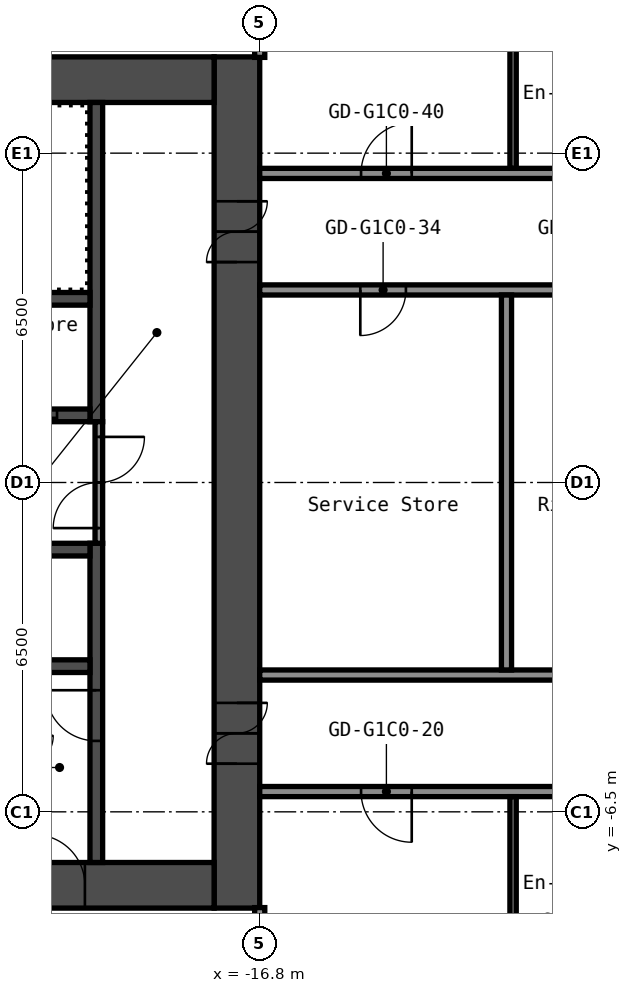
"""IFC4 building model, lengths in metres.
Left out: names, types, materials, properties, quantities, classifications, styles, units other than length and angle.
Written with IfcOpenShell. Run it as: python <this file> out.ifc"""

import sys

from ifc_helpers import new_model, si_unit, direction, frame, frame_2d, origin, place, context, subcontext, project, spatial, rectangle, extrude, element, fill, save


model = new_model("IFC4")
c1 = context("Model", 3, precision=1e-05, world=origin(), true_north=direction((0.0, 1.0)))
c2 = subcontext(c1, "Body", "Model", "MODEL_VIEW")
j1 = project(units=[si_unit("LENGTHUNIT", "METRE"), si_unit("PLANEANGLEUNIT", "RADIAN")], contexts=[c1])
p1 = place(None, origin())
s1 = spatial("IfcSite", under=j1, at=p1, CompositionType="ELEMENT")
p2 = place(p1, origin())
s2 = spatial("IfcBuilding", under=s1, at=p2, CompositionType="ELEMENT")
p3 = place(p2, frame((0.0, 0.0, 26.2)))
s3 = spatial("IfcBuildingStorey", under=s2, at=p3, CompositionType="ELEMENT", Elevation=26.2)
p4 = place(p3, frame((-17.25, -8.4, 0.0), z_axis=(0.0, 0.0, 1.0), x_axis=(0.0, 1.0, 0.0)))
e1 = element("IfcWall", 1, at=p4, inside=s3, PredefinedType="SHEAR", context=c2, shape_type="SweptSolid", body=[
    extrude(rectangle(XDim=16.8, YDim=0.9, at=frame_2d((8.4, 0.0))), origin(), (0.0, 0.0, 1.0), 2.8),
])
p5 = place(p4, frame((12.75, 0.0, 0.0)))
e2 = element("IfcOpeningElement", 2, at=p5, cuts=e1, PredefinedType="OPENING", context=c2, shape_type="SweptSolid", body=[
    extrude(rectangle(XDim=1.2, YDim=2.1, at=frame_2d((0.6, 1.05))), frame((0.0, 0.46, 0.0), z_axis=(0.0, -1.0, 0.0), x_axis=(1.0, 0.0, 0.0)), (0.0, 0.0, 1.0), 0.92),
])
p6 = place(p4, frame((2.85, 0.0, 0.0)))
e3 = element("IfcOpeningElement", 3, at=p6, cuts=e1, PredefinedType="OPENING", context=c2, shape_type="SweptSolid", body=[
    extrude(rectangle(XDim=1.2, YDim=2.1, at=frame_2d((0.6, 1.05))), frame((0.0, 0.46, 0.0), z_axis=(0.0, -1.0, 0.0), x_axis=(1.0, 0.0, 0.0)), (0.0, 0.0, 1.0), 0.92),
])
p7 = place(p3, frame((-32.7, 7.95, 0.0), z_axis=(0.0, 0.0, 1.0), x_axis=(1.0, 0.0, 0.0)))
e4 = element("IfcWall", 4, at=p7, inside=s3, PredefinedType="SHEAR", context=c2, shape_type="SweptSolid", body=[
    extrude(rectangle(XDim=15.0, YDim=0.9, at=frame_2d((7.5, 0.0))), origin(), (0.0, 0.0, 1.0), 2.8),
])
p8 = place(p7, frame((3.4, 0.0, 0.0)))
e5 = element("IfcOpeningElement", 5, at=p8, cuts=e4, PredefinedType="OPENING", context=c2, shape_type="SweptSolid", body=[
    extrude(rectangle(XDim=1.2, YDim=2.1, at=frame_2d((0.6, 1.05))), frame((0.0, 0.46, 0.0), z_axis=(0.0, -1.0, 0.0), x_axis=(1.0, 0.0, 0.0)), (0.0, 0.0, 1.0), 0.92),
])
p9 = place(p7, frame((0.75, 0.0, 0.0)))
e6 = element("IfcOpeningElement", 6, at=p9, cuts=e4, PredefinedType="OPENING", context=c2, shape_type="SweptSolid", body=[
    extrude(rectangle(XDim=0.9, YDim=2.1, at=frame_2d((0.45, 1.05))), frame((0.0, 0.46, 0.0), z_axis=(0.0, -1.0, 0.0), x_axis=(1.0, 0.0, 0.0)), (0.0, 0.0, 1.0), 0.92),
])
p10 = place(p3, frame((-32.7, -7.95, 0.0), z_axis=(0.0, 0.0, 1.0), x_axis=(1.0, 0.0, 0.0)))
e7 = element("IfcWall", 7, at=p10, inside=s3, PredefinedType="SHEAR", context=c2, shape_type="SweptSolid", body=[
    extrude(rectangle(XDim=15.0, YDim=0.9, at=frame_2d((7.5, 0.0))), origin(), (0.0, 0.0, 1.0), 2.8),
])
p11 = place(p10, frame((11.45, 0.0, 0.0)))
e8 = element("IfcOpeningElement", 8, at=p11, cuts=e7, PredefinedType="OPENING", context=c2, shape_type="SweptSolid", body=[
    extrude(rectangle(XDim=1.0, YDim=2.1, at=frame_2d((0.5, 1.05))), frame((0.0, 0.46, 0.0), z_axis=(0.0, -1.0, 0.0), x_axis=(1.0, 0.0, 0.0)), (0.0, 0.0, 1.0), 0.92),
])
p12 = place(p3, frame((-20.025, 1.2, 0.0), z_axis=(0.0, 0.0, 1.0), x_axis=(0.0, 1.0, 0.0)))
e9 = element("IfcWall", 9, at=p12, inside=s3, PredefinedType="SHEAR", context=c2, shape_type="SweptSolid", body=[
    extrude(rectangle(XDim=6.3, YDim=0.25, at=frame_2d((3.15, 0.0))), origin(), (0.0, 0.0, 1.0), 2.8),
])
p13 = place(p3, frame((-20.025, -7.5, 0.0), z_axis=(0.0, 0.0, 1.0), x_axis=(0.0, 1.0, 0.0)))
e10 = element("IfcWall", 10, at=p13, inside=s3, PredefinedType="SHEAR", context=c2, shape_type="SweptSolid", body=[
    extrude(rectangle(XDim=6.3, YDim=0.25, at=frame_2d((3.15, 0.0))), origin(), (0.0, 0.0, 1.0), 2.8),
])
p14 = place(p13, frame((2.4, 0.0, 0.0)))
e11 = element("IfcOpeningElement", 11, at=p14, cuts=e10, PredefinedType="OPENING", context=c2, shape_type="SweptSolid", body=[
    extrude(rectangle(XDim=1.0, YDim=2.1, at=frame_2d((0.5, 1.05))), frame((0.0, 0.135, 0.0), z_axis=(0.0, -1.0, 0.0), x_axis=(1.0, 0.0, 0.0)), (0.0, 0.0, 1.0), 0.27),
])
p15 = place(p3, frame((-27.65, 1.325, 0.0), z_axis=(0.0, 0.0, 1.0), x_axis=(1.0, 0.0, 0.0)))
e12 = element("IfcWall", 12, at=p15, inside=s3, PredefinedType="SHEAR", context=c2, shape_type="SweptSolid", body=[
    extrude(rectangle(XDim=7.5, YDim=0.25, at=frame_2d((3.75, 0.0))), origin(), (0.0, 0.0, 1.0), 2.8),
])
p16 = place(p15, frame((5.75, 0.0, 0.0)))
e13 = element("IfcOpeningElement", 13, at=p16, cuts=e12, PredefinedType="OPENING", context=c2, shape_type="SweptSolid", body=[
    extrude(rectangle(XDim=1.1, YDim=2.1, at=frame_2d((0.55, 1.05))), frame((0.0, 0.135, 0.0), z_axis=(0.0, -1.0, 0.0), x_axis=(1.0, 0.0, 0.0)), (0.0, 0.0, 1.0), 0.27),
])
p17 = place(p15, frame((3.35, 0.0, 0.0)))
e14 = element("IfcOpeningElement", 14, at=p17, cuts=e12, PredefinedType="OPENING", context=c2, shape_type="SweptSolid", body=[
    extrude(rectangle(XDim=1.1, YDim=2.1, at=frame_2d((0.55, 1.05))), frame((0.0, 0.135, 0.0), z_axis=(0.0, -1.0, 0.0), x_axis=(1.0, 0.0, 0.0)), (0.0, 0.0, 1.0), 0.27),
])
p18 = place(p15, frame((0.95, 0.0, 0.0)))
e15 = element("IfcOpeningElement", 15, at=p18, cuts=e12, PredefinedType="OPENING", context=c2, shape_type="SweptSolid", body=[
    extrude(rectangle(XDim=1.1, YDim=2.1, at=frame_2d((0.55, 1.05))), frame((0.0, 0.135, 0.0), z_axis=(0.0, -1.0, 0.0), x_axis=(1.0, 0.0, 0.0)), (0.0, 0.0, 1.0), 0.27),
])
for number, where, z_axis, x_axis in (
    (16, (-27.65, 3.625, 0.0), (0.0, 0.0, 1.0), (1.0, 0.0, 0.0)),
    (17, (-27.65, -1.325, 0.0), (0.0, 0.0, 1.0), (1.0, 0.0, 0.0)),
    (18, (-27.65, -3.625, 0.0), (0.0, 0.0, 1.0), (1.0, 0.0, 0.0)),
):
    element("IfcWall", number, at=place(p3, frame(where, z_axis=z_axis, x_axis=x_axis)), inside=s3, PredefinedType="SHEAR", context=c2, shape_type="SweptSolid", body=[
        extrude(rectangle(XDim=7.5, YDim=0.25, at=frame_2d((3.75, 0.0))), origin(), (0.0, 0.0, 1.0), 2.8),
    ])
p19 = place(p3, frame((-19.975, -1.2, 0.0), z_axis=(0.0, 0.0, 1.0), x_axis=(0.0, 1.0, 0.0)))
e19 = element("IfcWall", 19, at=p19, inside=s3, PredefinedType="PARTITIONING", context=c2, shape_type="SweptSolid", body=[
    extrude(rectangle(XDim=2.4, YDim=0.15, at=frame_2d((1.2, 0.0))), origin(), (0.0, 0.0, 1.0), 2.8),
])
p20 = place(p19, frame((0.3, 0.0, 0.0)))
e20 = element("IfcOpeningElement", 20, at=p20, cuts=e19, PredefinedType="OPENING", context=c2, shape_type="SweptSolid", body=[
    extrude(rectangle(XDim=1.8, YDim=2.1, at=frame_2d((0.9, 1.05))), frame((0.0, 0.085, 0.0), z_axis=(0.0, -1.0, 0.0), x_axis=(1.0, 0.0, 0.0)), (0.0, 0.0, 1.0), 0.17),
])
p21 = place(p3, frame((-16.8, -6.1, 0.0), z_axis=(0.0, 0.0, 1.0), x_axis=(1.0, 0.0, 0.0)))
e21 = element("IfcWall", 21, at=p21, inside=s3, PredefinedType="PARTITIONING", context=c2, shape_type="SweptSolid", body=[
    extrude(rectangle(XDim=33.6, YDim=0.2, at=frame_2d((16.8, 0.0))), origin(), (0.0, 0.0, 1.0), 2.8),
])
p22 = place(p21, frame((2.0, 0.0, 0.0)))
e22 = element("IfcOpeningElement", 22, at=p22, cuts=e21, PredefinedType="OPENING", context=c2, shape_type="SweptSolid", body=[
    extrude(rectangle(XDim=1.0, YDim=2.1, at=frame_2d((0.5, 1.05))), frame((0.0, 0.11, 0.0), z_axis=(0.0, -1.0, 0.0), x_axis=(1.0, 0.0, 0.0)), (0.0, 0.0, 1.0), 0.22),
])
p23 = place(p21, frame((11.25, 0.0, 0.0)))
e23 = element("IfcOpeningElement", 23, at=p23, cuts=e21, PredefinedType="OPENING", context=c2, shape_type="SweptSolid", body=[
    extrude(rectangle(XDim=1.0, YDim=2.1, at=frame_2d((0.5, 1.05))), frame((0.0, 0.11, 0.0), z_axis=(0.0, -1.0, 0.0), x_axis=(1.0, 0.0, 0.0)), (0.0, 0.0, 1.0), 0.22),
])
p24 = place(p21, frame((12.95, 0.0, 0.0)))
e24 = element("IfcOpeningElement", 24, at=p24, cuts=e21, PredefinedType="OPENING", context=c2, shape_type="SweptSolid", body=[
    extrude(rectangle(XDim=1.0, YDim=2.1, at=frame_2d((0.5, 1.05))), frame((0.0, 0.11, 0.0), z_axis=(0.0, -1.0, 0.0), x_axis=(1.0, 0.0, 0.0)), (0.0, 0.0, 1.0), 0.22),
])
p25 = place(p21, frame((18.28, 0.0, 0.0)))
e25 = element("IfcOpeningElement", 25, at=p25, cuts=e21, PredefinedType="OPENING", context=c2, shape_type="SweptSolid", body=[
    extrude(rectangle(XDim=0.9, YDim=2.1, at=frame_2d((0.45, 1.05))), frame((0.0, 0.11, 0.0), z_axis=(0.0, -1.0, 0.0), x_axis=(1.0, 0.0, 0.0)), (0.0, 0.0, 1.0), 0.22),
])
p26 = place(p21, frame((22.48, 0.0, 0.0)))
e26 = element("IfcOpeningElement", 26, at=p26, cuts=e21, PredefinedType="OPENING", context=c2, shape_type="SweptSolid", body=[
    extrude(rectangle(XDim=0.9, YDim=2.1, at=frame_2d((0.45, 1.05))), frame((0.0, 0.11, 0.0), z_axis=(0.0, -1.0, 0.0), x_axis=(1.0, 0.0, 0.0)), (0.0, 0.0, 1.0), 0.22),
])
p27 = place(p21, frame((28.05, 0.0, 0.0)))
e27 = element("IfcOpeningElement", 27, at=p27, cuts=e21, PredefinedType="OPENING", context=c2, shape_type="SweptSolid", body=[
    extrude(rectangle(XDim=1.0, YDim=2.1, at=frame_2d((0.5, 1.05))), frame((0.0, 0.11, 0.0), z_axis=(0.0, -1.0, 0.0), x_axis=(1.0, 0.0, 0.0)), (0.0, 0.0, 1.0), 0.22),
])
p28 = place(p21, frame((29.75, 0.0, 0.0)))
e28 = element("IfcOpeningElement", 28, at=p28, cuts=e21, PredefinedType="OPENING", context=c2, shape_type="SweptSolid", body=[
    extrude(rectangle(XDim=1.0, YDim=2.1, at=frame_2d((0.5, 1.05))), frame((0.0, 0.11, 0.0), z_axis=(0.0, -1.0, 0.0), x_axis=(1.0, 0.0, 0.0)), (0.0, 0.0, 1.0), 0.22),
])
p29 = place(p3, frame((-16.8, -3.8, 0.0), z_axis=(0.0, 0.0, 1.0), x_axis=(1.0, 0.0, 0.0)))
e29 = element("IfcWall", 29, at=p29, inside=s3, PredefinedType="PARTITIONING", context=c2, shape_type="SweptSolid", body=[
    extrude(rectangle(XDim=33.6, YDim=0.2, at=frame_2d((16.8, 0.0))), origin(), (0.0, 0.0, 1.0), 2.8),
])
p30 = place(p29, frame((9.715, 0.0, 0.0)))
e30 = element("IfcOpeningElement", 30, at=p30, cuts=e29, PredefinedType="OPENING", context=c2, shape_type="SweptSolid", body=[
    extrude(rectangle(XDim=0.9, YDim=2.1, at=frame_2d((0.45, 1.05))), frame((0.0, 0.11, 0.0), z_axis=(0.0, -1.0, 0.0), x_axis=(1.0, 0.0, 0.0)), (0.0, 0.0, 1.0), 0.22),
])
p31 = place(p29, frame((13.915, 0.0, 0.0)))
e31 = element("IfcOpeningElement", 31, at=p31, cuts=e29, PredefinedType="OPENING", context=c2, shape_type="SweptSolid", body=[
    extrude(rectangle(XDim=0.9, YDim=2.1, at=frame_2d((0.45, 1.05))), frame((0.0, 0.11, 0.0), z_axis=(0.0, -1.0, 0.0), x_axis=(1.0, 0.0, 0.0)), (0.0, 0.0, 1.0), 0.22),
])
p32 = place(p29, frame((26.345, 0.0, 0.0)))
e32 = element("IfcOpeningElement", 32, at=p32, cuts=e29, PredefinedType="OPENING", context=c2, shape_type="SweptSolid", body=[
    extrude(rectangle(XDim=0.9, YDim=2.1, at=frame_2d((0.45, 1.05))), frame((0.0, 0.11, 0.0), z_axis=(0.0, -1.0, 0.0), x_axis=(1.0, 0.0, 0.0)), (0.0, 0.0, 1.0), 0.22),
])
p33 = place(p29, frame((30.545, 0.0, 0.0)))
e33 = element("IfcOpeningElement", 33, at=p33, cuts=e29, PredefinedType="OPENING", context=c2, shape_type="SweptSolid", body=[
    extrude(rectangle(XDim=0.9, YDim=2.1, at=frame_2d((0.45, 1.05))), frame((0.0, 0.11, 0.0), z_axis=(0.0, -1.0, 0.0), x_axis=(1.0, 0.0, 0.0)), (0.0, 0.0, 1.0), 0.22),
])
p34 = place(p3, frame((-16.8, 3.8, 0.0), z_axis=(0.0, 0.0, 1.0), x_axis=(1.0, 0.0, 0.0)))
e34 = element("IfcWall", 34, at=p34, inside=s3, PredefinedType="PARTITIONING", context=c2, shape_type="SweptSolid", body=[
    extrude(rectangle(XDim=33.6, YDim=0.2, at=frame_2d((16.8, 0.0))), origin(), (0.0, 0.0, 1.0), 2.8),
])
p35 = place(p34, frame((1.985, 0.0, 0.0)))
e35 = element("IfcOpeningElement", 35, at=p35, cuts=e34, PredefinedType="OPENING", context=c2, shape_type="SweptSolid", body=[
    extrude(rectangle(XDim=0.9, YDim=2.1, at=frame_2d((0.45, 1.05))), frame((0.0, 0.11, 0.0), z_axis=(0.0, -1.0, 0.0), x_axis=(1.0, 0.0, 0.0)), (0.0, 0.0, 1.0), 0.22),
])
p36 = place(p34, frame((6.185, 0.0, 0.0)))
e36 = element("IfcOpeningElement", 36, at=p36, cuts=e34, PredefinedType="OPENING", context=c2, shape_type="SweptSolid", body=[
    extrude(rectangle(XDim=0.9, YDim=2.1, at=frame_2d((0.45, 1.05))), frame((0.0, 0.11, 0.0), z_axis=(0.0, -1.0, 0.0), x_axis=(1.0, 0.0, 0.0)), (0.0, 0.0, 1.0), 0.22),
])
p37 = place(p34, frame((18.2, 0.0, 0.0)))
e37 = element("IfcOpeningElement", 37, at=p37, cuts=e34, PredefinedType="OPENING", context=c2, shape_type="SweptSolid", body=[
    extrude(rectangle(XDim=0.9, YDim=2.1, at=frame_2d((0.45, 1.05))), frame((0.0, 0.11, 0.0), z_axis=(0.0, -1.0, 0.0), x_axis=(1.0, 0.0, 0.0)), (0.0, 0.0, 1.0), 0.22),
])
p38 = place(p34, frame((22.4, 0.0, 0.0)))
e38 = element("IfcOpeningElement", 38, at=p38, cuts=e34, PredefinedType="OPENING", context=c2, shape_type="SweptSolid", body=[
    extrude(rectangle(XDim=0.9, YDim=2.1, at=frame_2d((0.45, 1.05))), frame((0.0, 0.11, 0.0), z_axis=(0.0, -1.0, 0.0), x_axis=(1.0, 0.0, 0.0)), (0.0, 0.0, 1.0), 0.22),
])
p39 = place(p3, frame((-16.8, 6.1, 0.0), z_axis=(0.0, 0.0, 1.0), x_axis=(1.0, 0.0, 0.0)))
e39 = element("IfcWall", 39, at=p39, inside=s3, PredefinedType="PARTITIONING", context=c2, shape_type="SweptSolid", body=[
    extrude(rectangle(XDim=33.6, YDim=0.2, at=frame_2d((16.8, 0.0))), origin(), (0.0, 0.0, 1.0), 2.8),
])
p40 = place(p39, frame((2.0, 0.0, 0.0)))
e40 = element("IfcOpeningElement", 40, at=p40, cuts=e39, PredefinedType="OPENING", context=c2, shape_type="SweptSolid", body=[
    extrude(rectangle(XDim=1.0, YDim=2.1, at=frame_2d((0.5, 1.05))), frame((0.0, 0.11, 0.0), z_axis=(0.0, -1.0, 0.0), x_axis=(1.0, 0.0, 0.0)), (0.0, 0.0, 1.0), 0.22),
])
p41 = place(p39, frame((11.25, 0.0, 0.0)))
e41 = element("IfcOpeningElement", 41, at=p41, cuts=e39, PredefinedType="OPENING", context=c2, shape_type="SweptSolid", body=[
    extrude(rectangle(XDim=1.0, YDim=2.1, at=frame_2d((0.5, 1.05))), frame((0.0, 0.11, 0.0), z_axis=(0.0, -1.0, 0.0), x_axis=(1.0, 0.0, 0.0)), (0.0, 0.0, 1.0), 0.22),
])
p42 = place(p39, frame((12.95, 0.0, 0.0)))
e42 = element("IfcOpeningElement", 42, at=p42, cuts=e39, PredefinedType="OPENING", context=c2, shape_type="SweptSolid", body=[
    extrude(rectangle(XDim=1.0, YDim=2.1, at=frame_2d((0.5, 1.05))), frame((0.0, 0.11, 0.0), z_axis=(0.0, -1.0, 0.0), x_axis=(1.0, 0.0, 0.0)), (0.0, 0.0, 1.0), 0.22),
])
p43 = place(p39, frame((18.7, 0.0, 0.0)))
e43 = element("IfcOpeningElement", 43, at=p43, cuts=e39, PredefinedType="OPENING", context=c2, shape_type="SweptSolid", body=[
    extrude(rectangle(XDim=0.9, YDim=2.1, at=frame_2d((0.45, 1.05))), frame((0.0, 0.11, 0.0), z_axis=(0.0, -1.0, 0.0), x_axis=(1.0, 0.0, 0.0)), (0.0, 0.0, 1.0), 0.22),
])
p44 = place(p39, frame((22.9, 0.0, 0.0)))
e44 = element("IfcOpeningElement", 44, at=p44, cuts=e39, PredefinedType="OPENING", context=c2, shape_type="SweptSolid", body=[
    extrude(rectangle(XDim=0.9, YDim=2.1, at=frame_2d((0.45, 1.05))), frame((0.0, 0.11, 0.0), z_axis=(0.0, -1.0, 0.0), x_axis=(1.0, 0.0, 0.0)), (0.0, 0.0, 1.0), 0.22),
])
p45 = place(p39, frame((28.05, 0.0, 0.0)))
e45 = element("IfcOpeningElement", 45, at=p45, cuts=e39, PredefinedType="OPENING", context=c2, shape_type="SweptSolid", body=[
    extrude(rectangle(XDim=1.0, YDim=2.1, at=frame_2d((0.5, 1.05))), frame((0.0, 0.11, 0.0), z_axis=(0.0, -1.0, 0.0), x_axis=(1.0, 0.0, 0.0)), (0.0, 0.0, 1.0), 0.22),
])
p46 = place(p39, frame((29.75, 0.0, 0.0)))
e46 = element("IfcOpeningElement", 46, at=p46, cuts=e39, PredefinedType="OPENING", context=c2, shape_type="SweptSolid", body=[
    extrude(rectangle(XDim=1.0, YDim=2.1, at=frame_2d((0.5, 1.05))), frame((0.0, 0.11, 0.0), z_axis=(0.0, -1.0, 0.0), x_axis=(1.0, 0.0, 0.0)), (0.0, 0.0, 1.0), 0.22),
])
for number, where, z_axis, x_axis in (
    (47, (-16.8, -20.3, 0.0), (0.0, 0.0, 1.0), (0.0, 1.0, 0.0)),
    (48, (-16.8, 8.39, 0.0), (0.0, 0.0, 1.0), (0.0, 1.0, 0.0)),
):
    element("IfcWall", number, at=place(p3, frame(where, z_axis=z_axis, x_axis=x_axis)), inside=s3, PredefinedType="PARTITIONING", context=c2, shape_type="SweptSolid", body=[
        extrude(rectangle(XDim=11.91, YDim=0.2, at=frame_2d((5.955, 0.0))), origin(), (0.0, 0.0, 1.0), 2.8),
    ])
p47 = place(p3, frame((-11.93, -3.7, 0.0), z_axis=(0.0, 0.0, 1.0), x_axis=(0.0, 1.0, 0.0)))
e49 = element("IfcWall", 49, at=p47, inside=s3, PredefinedType="PARTITIONING", context=c2, shape_type="SweptSolid", body=[
    extrude(rectangle(XDim=7.4, YDim=0.2, at=frame_2d((3.7, 0.0))), origin(), (0.0, 0.0, 1.0), 2.8),
])
for number, where, z_axis, x_axis in (
    (50, (-11.8, -9.5, 0.0), (0.0, 0.0, 1.0), (0.0, 1.0, 0.0)),
    (51, (-11.8, 6.2, 0.0), (0.0, 0.0, 1.0), (0.0, 1.0, 0.0)),
):
    element("IfcWall", number, at=place(p3, frame(where, z_axis=z_axis, x_axis=x_axis)), inside=s3, PredefinedType="PARTITIONING", context=c2, shape_type="SweptSolid", body=[
        extrude(rectangle(XDim=3.3, YDim=0.125, at=frame_2d((1.65, 0.0))), origin(), (0.0, 0.0, 1.0), 2.8),
    ])
p48 = place(p5, origin())
e52 = element("IfcDoor", 52, at=p48, inside=s3, OperationType="DOUBLE_DOOR_SINGLE_SWING", PredefinedType="DOOR", context=c2, shape_type="SweptSolid", body=[
    extrude(rectangle(XDim=1.2, YDim=2.1, at=frame_2d((0.6, 1.05))), frame((0.0, 0.025, 0.0), z_axis=(0.0, -1.0, 0.0), x_axis=(1.0, 0.0, 0.0)), (0.0, 0.0, 1.0), 0.05),
])
fill(e2, e52)
p49 = place(p6, origin())
e53 = element("IfcDoor", 53, at=p49, inside=s3, OperationType="DOUBLE_DOOR_SINGLE_SWING", PredefinedType="DOOR", context=c2, shape_type="SweptSolid", body=[
    extrude(rectangle(XDim=1.2, YDim=2.1, at=frame_2d((0.6, 1.05))), frame((0.0, 0.025, 0.0), z_axis=(0.0, -1.0, 0.0), x_axis=(1.0, 0.0, 0.0)), (0.0, 0.0, 1.0), 0.05),
])
fill(e3, e53)
p50 = place(p11, origin())
e54 = element("IfcDoor", 54, at=p50, inside=s3, OperationType="SINGLE_SWING_RIGHT", PredefinedType="DOOR", context=c2, shape_type="SweptSolid", body=[
    extrude(rectangle(XDim=1.0, YDim=2.1, at=frame_2d((0.5, 1.05))), frame((0.0, 0.025, 0.0), z_axis=(0.0, -1.0, 0.0), x_axis=(1.0, 0.0, 0.0)), (0.0, 0.0, 1.0), 0.05),
])
fill(e8, e54)
p51 = place(p14, origin())
e55 = element("IfcDoor", 55, at=p51, inside=s3, OperationType="SINGLE_SWING_LEFT", PredefinedType="DOOR", context=c2, shape_type="SweptSolid", body=[
    extrude(rectangle(XDim=1.0, YDim=2.1, at=frame_2d((0.5, 1.05))), frame((0.0, 0.025, 0.0), z_axis=(0.0, -1.0, 0.0), x_axis=(1.0, 0.0, 0.0)), (0.0, 0.0, 1.0), 0.05),
])
fill(e11, e55)
p52 = place(p20, origin())
e56 = element("IfcDoor", 56, at=p52, inside=s3, OperationType="DOUBLE_DOOR_SINGLE_SWING", PredefinedType="DOOR", context=c2, shape_type="SweptSolid", body=[
    extrude(rectangle(XDim=1.8, YDim=2.1, at=frame_2d((0.9, 1.05))), frame((0.0, 0.025, 0.0), z_axis=(0.0, -1.0, 0.0), x_axis=(1.0, 0.0, 0.0)), (0.0, 0.0, 1.0), 0.05),
])
fill(e20, e56)
p53 = place(p16, origin())
e57 = element("IfcDoor", 57, at=p53, inside=s3, OperationType="DOUBLE_DOOR_SLIDING", PredefinedType="DOOR", context=c2, shape_type="SweptSolid", body=[
    extrude(rectangle(XDim=1.1, YDim=2.1, at=frame_2d((0.55, 1.05))), frame((0.0, 0.025, 0.0), z_axis=(0.0, -1.0, 0.0), x_axis=(1.0, 0.0, 0.0)), (0.0, 0.0, 1.0), 0.05),
])
fill(e13, e57)
p54 = place(p22, origin())
e58 = element("IfcDoor", 58, at=p54, inside=s3, OperationType="SINGLE_SWING_RIGHT", PredefinedType="DOOR", context=c2, shape_type="SweptSolid", body=[
    extrude(rectangle(XDim=1.0, YDim=2.1, at=frame_2d((0.5, 1.05))), frame((0.0, 0.025, 0.0), z_axis=(0.0, -1.0, 0.0), x_axis=(1.0, 0.0, 0.0)), (0.0, 0.0, 1.0), 0.05),
])
fill(e22, e58)
p55 = place(p35, origin())
e59 = element("IfcDoor", 59, at=p55, inside=s3, OperationType="SINGLE_SWING_LEFT", PredefinedType="DOOR", context=c2, shape_type="SweptSolid", body=[
    extrude(rectangle(XDim=0.9, YDim=2.1, at=frame_2d((0.45, 1.05))), frame((0.0, 0.025, 0.0), z_axis=(0.0, -1.0, 0.0), x_axis=(1.0, 0.0, 0.0)), (0.0, 0.0, 1.0), 0.05),
])
fill(e35, e59)
p56 = place(p40, origin())
e60 = element("IfcDoor", 60, at=p56, inside=s3, OperationType="SINGLE_SWING_LEFT", PredefinedType="DOOR", context=c2, shape_type="SweptSolid", body=[
    extrude(rectangle(XDim=1.0, YDim=2.1, at=frame_2d((0.5, 1.05))), frame((0.0, 0.025, 0.0), z_axis=(0.0, -1.0, 0.0), x_axis=(1.0, 0.0, 0.0)), (0.0, 0.0, 1.0), 0.05),
])
fill(e40, e60)
save(model, sys.argv[1])
